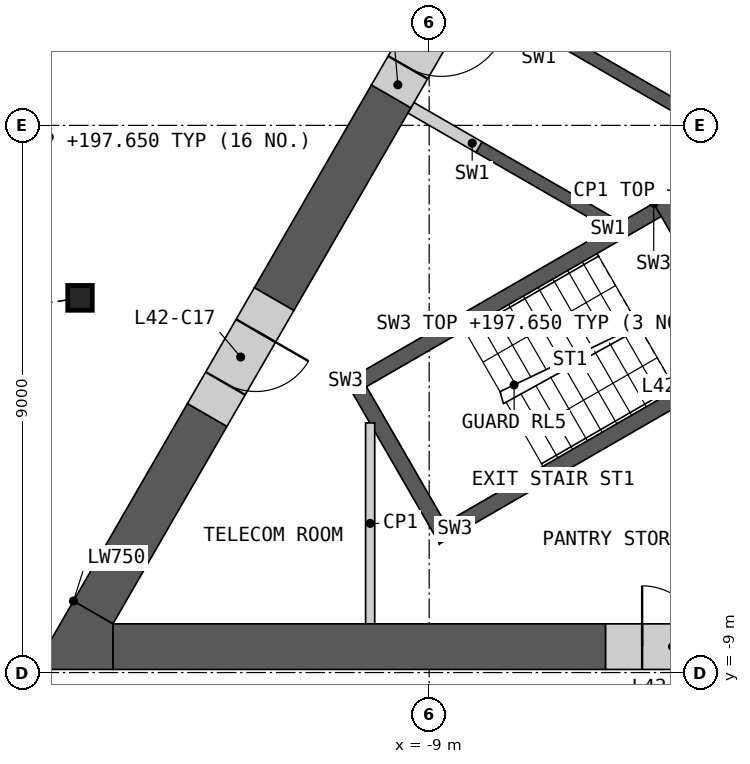
"""IFC4 building model, lengths in metres.
Left out: names, types, materials, properties, quantities, classifications, styles, units other than length and angle.
Written with IfcOpenShell. Run it as: python <this file> out.ifc"""

import sys

from ifc_helpers import new_model, si_unit, direction, frame, frame_2d, origin, origin_2d, place, context, subcontext, project, spatial, polyline, rectangle, i_section, outline, extrude, element, fill, save


model = new_model("IFC4")
c1 = context("Model", 3, precision=1e-05, world=origin(), true_north=direction((0.0, 1.0)))
c2 = subcontext(c1, "Body", "Model", "MODEL_VIEW")
j1 = project(units=[si_unit("LENGTHUNIT", "METRE"), si_unit("PLANEANGLEUNIT", "RADIAN")], contexts=[c1])
p1 = place(None, origin())
s1 = spatial("IfcSite", under=j1, at=p1, CompositionType="ELEMENT")
p2 = place(p1, origin())
s2 = spatial("IfcBuilding", under=s1, at=p2, CompositionType="ELEMENT")
p3 = place(p2, frame((0.0, 0.0, 194.4)))
s3 = spatial("IfcBuildingStorey", under=s2, at=p3, CompositionType="ELEMENT", Elevation=194.4)
p4 = place(p3, frame((-14.743, -2.837, 0.0), z_axis=(0.0, 0.0, 1.0), x_axis=(1.0, 0.0, 0.0)))
e1 = element("IfcColumn", 1, at=p4, inside=s3, PredefinedType="COLUMN", context=c2, shape_type="SweptSolid", body=[
    extrude(i_section(OverallWidth=0.404, OverallDepth=0.407, WebThickness=0.027, FlangeThickness=0.044, at=origin_2d()), origin(), (0.0, 0.0, 1.0), 3.6),
])
p5 = place(p3, origin())
e2 = element("IfcWall", 2, at=p5, inside=s3, PredefinedType="SHEAR", context=c2, shape_type="SweptSolid", body=[
    extrude(outline(polyline([(-6.061, -1.697), (-8.231, -0.444), (-8.131, -0.271), (-5.96, -1.524), (-6.061, -1.697)])), origin(), (0.0, 0.0, 1.0), 3.25),
])
p6 = place(p3, origin())
e3 = element("IfcWall", 3, at=p6, inside=s3, PredefinedType="SHEAR", context=c2, shape_type="SweptSolid", body=[
    extrude(outline(polyline([(-4.96, 0.208), (-7.131, 1.461), (-3.731, 7.35), (-1.561, 6.097), (-1.66, 5.924), (-3.652, 7.074), (-4.652, 5.342), (-2.66, 4.192), (-2.76, 4.019), (-4.752, 5.169), (-5.752, 3.437), (-3.76, 2.287), (-3.861, 2.113), (-5.852, 3.263), (-6.852, 1.531), (-4.861, 0.381), (-4.96, 0.208)])), origin(), (0.0, 0.0, 1.0), 3.25),
])
p7 = place(p3, frame((-8.181, -0.357, 0.0), z_axis=(0.0, 0.0, 1.0), x_axis=(-0.866003189247, 0.500038474733, 0.0)))
e4 = element("IfcWall", 4, at=p7, inside=s3, PredefinedType="SHEAR", context=c2, shape_type="SweptSolid", body=[
    extrude(rectangle(XDim=1.293, YDim=0.2, at=frame_2d((0.646, 0.0))), origin(), (0.0, 0.0, 1.0), 3.25),
])
p8 = place(p3, origin())
e5 = element("IfcWall", 5, at=p8, inside=s3, PredefinedType="SHEAR", context=c2, shape_type="SweptSolid", body=[
    extrude(outline(polyline([(-5.307, -1.281), (-10.374, -4.206), (-10.032, -4.298), (-5.182, -1.498), (-5.307, -1.281)])), origin(), (0.0, 0.0, 1.0), 3.25),
])
p9 = place(p3, origin())
e6 = element("IfcWall", 6, at=p9, inside=s3, PredefinedType="SHEAR", context=c2, shape_type="SweptSolid", body=[
    extrude(outline(polyline([(-10.374, -4.206), (-8.83, -6.881), (-8.738, -6.539), (-10.032, -4.298), (-10.374, -4.206)])), origin(), (0.0, 0.0, 1.0), 3.25),
])
p10 = place(p3, origin())
e7 = element("IfcWall", 7, at=p10, inside=s3, PredefinedType="SHEAR", context=c2, shape_type="SweptSolid", body=[
    extrude(outline(polyline([(-8.738, -6.539), (-8.83, -6.881), (-3.763, -3.956), (-3.888, -3.739), (-8.738, -6.539)])), origin(), (0.0, 0.0, 1.0), 3.25),
])
p11 = place(p3, frame((-5.199, -1.219, 0.0), z_axis=(0.0, 0.0, 1.0), x_axis=(0.499982516597, -0.866035497597, 0.0)))
e8 = element("IfcWall", 8, at=p11, inside=s3, PredefinedType="SHEAR", context=c2, shape_type="SweptSolid", body=[
    extrude(rectangle(XDim=3.088, YDim=0.25, at=frame_2d((1.544, 0.0))), origin(), (0.0, 0.0, 1.0), 3.25),
])
p12 = place(p11, frame((0.994, 0.0, 0.0)))
e9 = element("IfcOpeningElement", 9, at=p12, cuts=e8, PredefinedType="OPENING", context=c2, shape_type="SweptSolid", body=[
    extrude(rectangle(XDim=1.1, YDim=2.1, at=frame_2d((0.55, 1.05))), frame((0.0, 0.135, 0.0), z_axis=(0.0, -1.0, 0.0), x_axis=(1.0, 0.0, 0.0)), (0.0, 0.0, 1.0), 0.27),
])
p13 = place(p3, frame((-9.971, -8.199, 0.0), z_axis=(0.0, 0.0, 1.0), x_axis=(0.0, 1.0, 0.0)))
e10 = element("IfcWall", 10, at=p13, inside=s3, PredefinedType="PARTITIONING", context=c2, shape_type="SweptSolid", body=[
    extrude(rectangle(XDim=3.305, YDim=0.15, at=frame_2d((1.652, 0.0))), origin(), (0.0, 0.0, 1.0), 3.25),
])
p14 = place(p3, frame((-14.201, -8.574, 0.0), z_axis=(0.0, 0.0, 1.0), x_axis=(1.0, 0.0, 0.0)))
e11 = element("IfcWall", 11, at=p14, inside=s3, PredefinedType="SHEAR", context=c2, shape_type="SweptSolid", body=[
    extrude(rectangle(XDim=8.103, YDim=0.75, at=frame_2d((4.052, 0.0))), origin(), (0.0, 0.0, 1.0), 3.25),
])
p15 = place(p3, frame((-9.625, 0.477, 0.0), z_axis=(0.0, 0.0, 1.0), x_axis=(-0.499951145694, -0.866053607994, 0.0)))
e12 = element("IfcWall", 12, at=p15, inside=s3, PredefinedType="SHEAR", context=c2, shape_type="SweptSolid", body=[
    extrude(rectangle(XDim=3.851, YDim=0.75, at=frame_2d((1.925, 0.0))), origin(), (0.0, 0.0, 1.0), 3.25),
])
p16 = place(p3, frame((-12.65, -4.763, 0.0), z_axis=(0.0, 0.0, 1.0), x_axis=(-0.499996681051, -0.866027319972, 0.0)))
e13 = element("IfcWall", 13, at=p16, inside=s3, PredefinedType="SHEAR", context=c2, shape_type="SweptSolid", body=[
    extrude(rectangle(XDim=3.75, YDim=0.75, at=frame_2d((1.875, 0.0))), origin(), (0.0, 0.0, 1.0), 3.25),
])
p17 = place(p3, origin())
e14 = element("IfcWall", 14, at=p17, inside=s3, PredefinedType="SHEAR", context=c2, shape_type="SweptSolid", body=[
    extrude(outline(polyline([(-14.851, -7.824), (-14.201, -8.199), (-14.201, -8.949), (-15.5, -8.949), (-14.851, -7.824)])), origin(), (0.0, 0.0, 1.0), 3.25),
])
p18 = place(p3, frame((-6.098, -8.574, 0.0), z_axis=(0.0, 0.0, 1.0), x_axis=(1.0, 0.0, 0.0)))
e15 = element("IfcWall", 15, at=p18, inside=s3, PredefinedType="SHEAR", context=c2, shape_type="SweptSolid", body=[
    extrude(rectangle(XDim=2.2, YDim=0.75, at=frame_2d((1.1, 0.0))), origin(), (0.0, 0.0, 1.0), 3.25),
])
p19 = place(p18, frame((0.6, 0.0, 0.0)))
e16 = element("IfcOpeningElement", 16, at=p19, cuts=e15, PredefinedType="OPENING", context=c2, shape_type="SweptSolid", body=[
    extrude(rectangle(XDim=1.0, YDim=2.1, at=frame_2d((0.5, 1.05))), frame((0.0, 0.385, 0.0), z_axis=(0.0, -1.0, 0.0), x_axis=(1.0, 0.0, 0.0)), (0.0, 0.0, 1.0), 0.77),
])
p20 = place(p3, frame((-11.551, -2.858, 0.0), z_axis=(0.0, 0.0, 1.0), x_axis=(-0.499946605688, -0.86605622881, 0.0)))
e17 = element("IfcWall", 17, at=p20, inside=s3, PredefinedType="SHEAR", context=c2, shape_type="SweptSolid", body=[
    extrude(rectangle(XDim=2.2, YDim=0.75, at=frame_2d((1.1, 0.0))), origin(), (0.0, 0.0, 1.0), 3.25),
])
p21 = place(p20, frame((0.6, 0.0, 0.0)))
e18 = element("IfcOpeningElement", 18, at=p21, cuts=e17, PredefinedType="OPENING", context=c2, shape_type="SweptSolid", body=[
    extrude(rectangle(XDim=1.0, YDim=2.1, at=frame_2d((0.5, 1.05))), frame((0.0, 0.385, 0.0), z_axis=(0.0, -1.0, 0.0), x_axis=(1.0, 0.0, 0.0)), (0.0, 0.0, 1.0), 0.77),
])
p22 = place(p3, frame((-8.525, 2.382, 0.0), z_axis=(0.0, 0.0, 1.0), x_axis=(-0.500077893725, -0.86598042715, 0.0)))
e19 = element("IfcWall", 19, at=p22, inside=s3, PredefinedType="SHEAR", context=c2, shape_type="SweptSolid", body=[
    extrude(rectangle(XDim=2.2, YDim=0.75, at=frame_2d((1.1, 0.0))), origin(), (0.0, 0.0, 1.0), 3.25),
])
p23 = place(p22, frame((0.55, 0.0, 0.0)))
e20 = element("IfcOpeningElement", 20, at=p23, cuts=e19, PredefinedType="OPENING", context=c2, shape_type="SweptSolid", body=[
    extrude(rectangle(XDim=1.1, YDim=2.1, at=frame_2d((0.55, 1.05))), frame((0.0, 0.385, 0.0), z_axis=(0.0, -1.0, 0.0), x_axis=(1.0, 0.0, 0.0)), (0.0, 0.0, 1.0), 0.77),
])
p24 = place(p3, frame((-19.476, -5.035, 0.0), z_axis=(0.0, 0.0, 1.0), x_axis=(0.500000757641, 0.86602496636, 0.0)))
e21 = element("IfcWall", 21, at=p24, inside=s3, PredefinedType="PARTITIONING", context=c2, shape_type="SweptSolid", body=[
    extrude(rectangle(XDim=28.198, YDim=0.2, at=frame_2d((14.099, 0.0))), origin(), (0.0, 0.0, 1.0), 3.25),
])
p25 = place(p24, frame((25.796, 0.0, 0.0)))
e22 = element("IfcOpeningElement", 22, at=p25, cuts=e21, PredefinedType="OPENING", context=c2, shape_type="SweptSolid", body=[
    extrude(rectangle(XDim=0.95, YDim=2.1, at=frame_2d((0.475, 1.05))), frame((0.0, 0.11, 0.0), z_axis=(0.0, -1.0, 0.0), x_axis=(1.0, 0.0, 0.0)), (0.0, 0.0, 1.0), 0.22),
])
p26 = place(p24, frame((14.603, 0.0, 0.0)))
e23 = element("IfcOpeningElement", 23, at=p26, cuts=e21, PredefinedType="OPENING", context=c2, shape_type="SweptSolid", body=[
    extrude(rectangle(XDim=1.1, YDim=2.1, at=frame_2d((0.55, 1.05))), frame((0.0, 0.11, 0.0), z_axis=(0.0, -1.0, 0.0), x_axis=(1.0, 0.0, 0.0)), (0.0, 0.0, 1.0), 0.22),
])
p27 = place(p24, frame((11.993, 0.0, 0.0)))
e24 = element("IfcOpeningElement", 24, at=p27, cuts=e21, PredefinedType="OPENING", context=c2, shape_type="SweptSolid", body=[
    extrude(rectangle(XDim=1.1, YDim=2.1, at=frame_2d((0.55, 1.05))), frame((0.0, 0.11, 0.0), z_axis=(0.0, -1.0, 0.0), x_axis=(1.0, 0.0, 0.0)), (0.0, 0.0, 1.0), 0.22),
])
p28 = place(p24, frame((1.452, 0.0, 0.0)))
e25 = element("IfcOpeningElement", 25, at=p28, cuts=e21, PredefinedType="OPENING", context=c2, shape_type="SweptSolid", body=[
    extrude(rectangle(XDim=0.95, YDim=2.1, at=frame_2d((0.475, 1.05))), frame((0.0, 0.11, 0.0), z_axis=(0.0, -1.0, 0.0), x_axis=(1.0, 0.0, 0.0)), (0.0, 0.0, 1.0), 0.22),
])
p29 = place(p19, origin())
e26 = element("IfcDoor", 26, at=p29, inside=s3, OperationType="SINGLE_SWING_LEFT", PredefinedType="DOOR", context=c2, shape_type="SweptSolid", body=[
    extrude(rectangle(XDim=1.0, YDim=2.1, at=frame_2d((0.5, 1.05))), frame((0.0, 0.13, 0.0), z_axis=(0.0, -1.0, 0.0), x_axis=(1.0, 0.0, 0.0)), (0.0, 0.0, 1.0), 0.05),
])
fill(e16, e26)
p30 = place(p21, origin())
e27 = element("IfcDoor", 27, at=p30, inside=s3, OperationType="SINGLE_SWING_LEFT", PredefinedType="DOOR", context=c2, shape_type="SweptSolid", body=[
    extrude(rectangle(XDim=1.0, YDim=2.1, at=frame_2d((0.5, 1.05))), frame((0.0, 0.13, 0.0), z_axis=(0.0, -1.0, 0.0), x_axis=(1.0, 0.0, 0.0)), (0.0, 0.0, 1.0), 0.05),
])
fill(e18, e27)
p31 = place(p23, origin())
e28 = element("IfcDoor", 28, at=p31, inside=s3, OperationType="SINGLE_SWING_LEFT", PredefinedType="DOOR", context=c2, shape_type="SweptSolid", body=[
    extrude(rectangle(XDim=1.1, YDim=2.1, at=frame_2d((0.55, 1.05))), frame((0.0, 0.13, 0.0), z_axis=(0.0, -1.0, 0.0), x_axis=(1.0, 0.0, 0.0)), (0.0, 0.0, 1.0), 0.05),
])
fill(e20, e28)
save(model, sys.argv[1])
